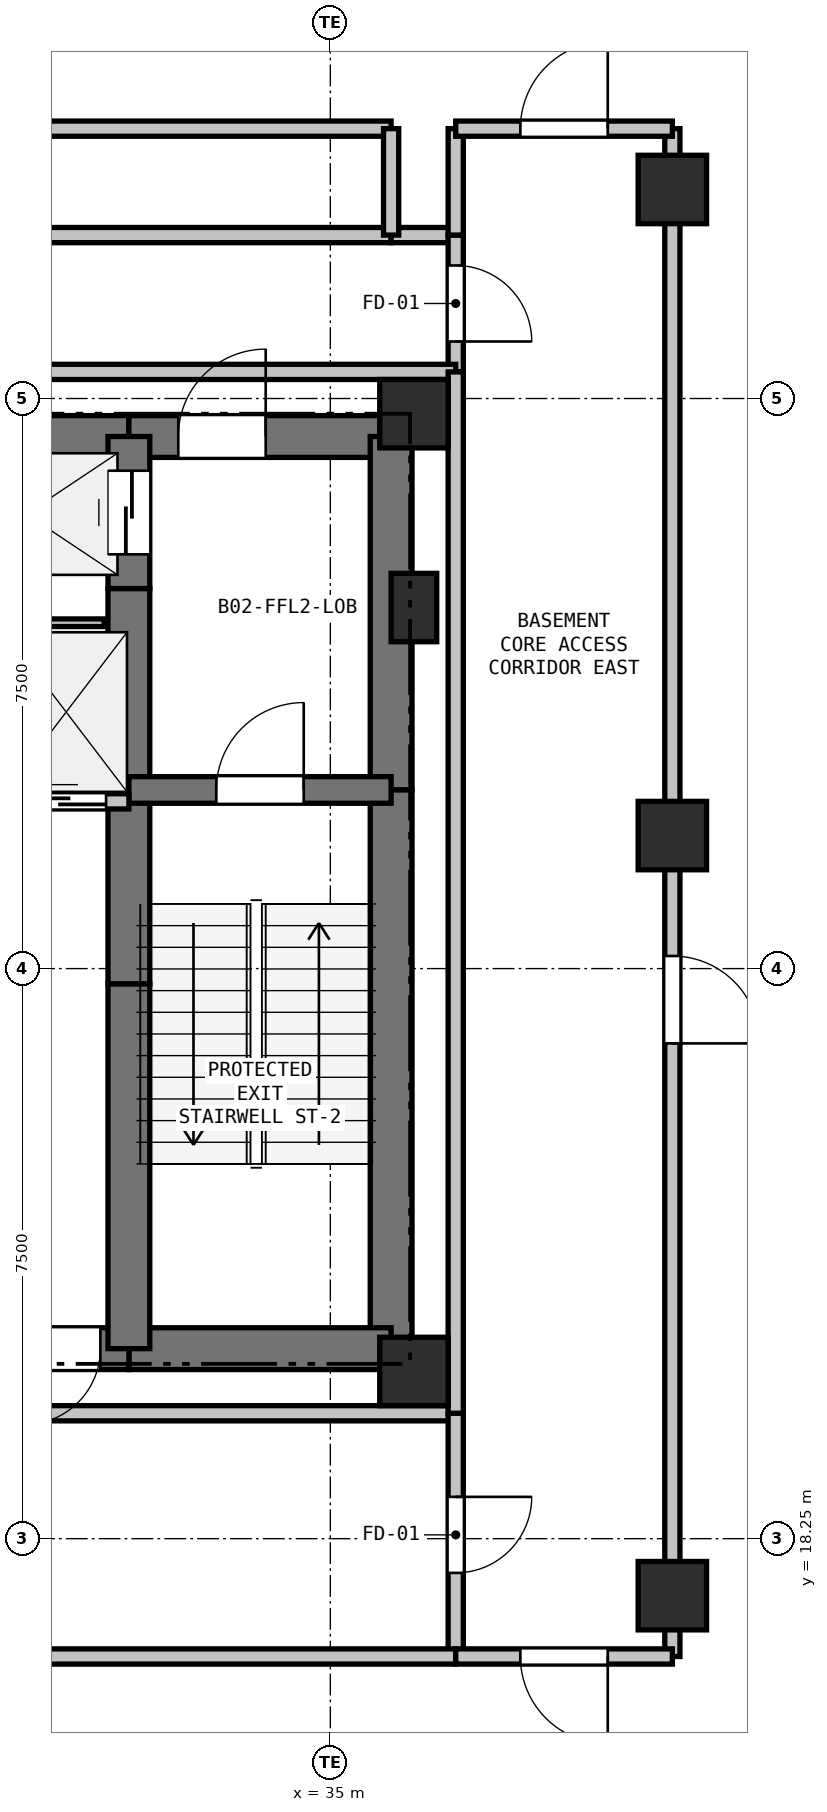
"""IFC4 building model, lengths in metres.
Left out: names, types, materials, properties, quantities, classifications, styles, units other than length and angle.
Written with IfcOpenShell. Run it as: python <this file> out.ifc"""

import sys

from ifc_helpers import new_model, si_unit, direction, frame, frame_2d, origin, origin_2d, place, context, subcontext, project, spatial, rectangle, extrude, element, fill, save


model = new_model("IFC4")
c1 = context("Model", 3, precision=1e-05, world=origin(), true_north=direction((0.0, 1.0)))
c2 = subcontext(c1, "Body", "Model", "MODEL_VIEW")
j1 = project(units=[si_unit("LENGTHUNIT", "METRE"), si_unit("PLANEANGLEUNIT", "RADIAN")], contexts=[c1])
p1 = place(None, origin())
s1 = spatial("IfcSite", under=j1, at=p1, CompositionType="ELEMENT")
p2 = place(p1, origin())
s2 = spatial("IfcBuilding", under=s1, at=p2, CompositionType="ELEMENT")
p3 = place(p2, frame((0.0, 0.0, -9.0)))
s3 = spatial("IfcBuildingStorey", under=s2, at=p3, CompositionType="ELEMENT", Elevation=-9.0)
for number, where, z_axis, x_axis in (
    (1, (39.5, 17.5, 0.0), (0.0, 0.0, 1.0), (1.0, 0.0, 0.0)),
    (2, (39.5, 27.5, 0.0), (0.0, 0.0, 1.0), (1.0, 0.0, 0.0)),
    (3, (39.5, 36.0, 0.0), (0.0, 0.0, 1.0), (1.0, 0.0, 0.0)),
    (4, (36.1, 33.05, 0.0), (0.0, 0.0, 1.0), (1.0, 0.0, 0.0)),
    (5, (36.1, 20.45, 0.0), (0.0, 0.0, 1.0), (1.0, 0.0, 0.0)),
):
    element("IfcColumn", number, at=place(p3, frame(where, z_axis=z_axis, x_axis=x_axis)), inside=s3, PredefinedType="COLUMN", context=c2, shape_type="SweptSolid", body=[
        extrude(rectangle(XDim=0.9, YDim=0.9, at=origin_2d()), origin(), (0.0, 0.0, 1.0), 4.5),
    ])
p4 = place(p3, frame((36.1, 30.5, 0.0), z_axis=(0.0, 0.0, 1.0), x_axis=(1.0, 0.0, 0.0)))
e6 = element("IfcColumn", 6, at=p4, inside=s3, PredefinedType="PILASTER", context=c2, shape_type="SweptSolid", body=[
    extrude(rectangle(XDim=0.6, YDim=0.9, at=origin_2d()), origin(), (0.0, 0.0, 1.0), 4.5),
])
p5 = place(p3, frame((29.65, 32.75, 0.0), z_axis=(0.0, 0.0, 1.0), x_axis=(1.0, 0.0, 0.0)))
e7 = element("IfcWall", 7, at=p5, inside=s3, PredefinedType="SHEAR", context=c2, shape_type="SweptSolid", body=[
    extrude(rectangle(XDim=2.7, YDim=0.55, at=frame_2d((1.35, 0.0))), origin(), (0.0, 0.0, 1.0), 4.2),
])
p6 = place(p3, frame((32.35, 32.75, 0.0), z_axis=(0.0, 0.0, 1.0), x_axis=(1.0, 0.0, 0.0)))
e8 = element("IfcWall", 8, at=p6, inside=s3, PredefinedType="SHEAR", context=c2, shape_type="SweptSolid", body=[
    extrude(rectangle(XDim=3.45, YDim=0.55, at=frame_2d((1.725, 0.0))), origin(), (0.0, 0.0, 1.0), 4.2),
])
p7 = place(p6, frame((0.65, 0.0, 0.0)))
e9 = element("IfcOpeningElement", 9, at=p7, cuts=e8, PredefinedType="OPENING", context=c2, shape_type="SweptSolid", body=[
    extrude(rectangle(XDim=1.15, YDim=2.15, at=frame_2d((0.575, 1.075))), frame((0.0, 0.285, 0.0), z_axis=(0.0, -1.0, 0.0), x_axis=(1.0, 0.0, 0.0)), (0.0, 0.0, 1.0), 0.57),
])
p8 = place(p3, frame((35.8, 32.75, 0.0), z_axis=(0.0, 0.0, 1.0), x_axis=(0.0, -1.0, 0.0)))
e10 = element("IfcWall", 10, at=p8, inside=s3, PredefinedType="SHEAR", context=c2, shape_type="SweptSolid", body=[
    extrude(rectangle(XDim=4.65, YDim=0.55, at=frame_2d((2.325, 0.0))), origin(), (0.0, 0.0, 1.0), 4.2),
])
p9 = place(p3, frame((35.8, 28.1, 0.0), z_axis=(0.0, 0.0, 1.0), x_axis=(0.0, -1.0, 0.0)))
e11 = element("IfcWall", 11, at=p9, inside=s3, PredefinedType="SHEAR", context=c2, shape_type="SweptSolid", body=[
    extrude(rectangle(XDim=7.35, YDim=0.55, at=frame_2d((3.675, 0.0))), origin(), (0.0, 0.0, 1.0), 4.2),
])
p10 = place(p3, frame((35.8, 20.75, 0.0), z_axis=(0.0, 0.0, 1.0), x_axis=(-1.0, 0.0, 0.0)))
e12 = element("IfcWall", 12, at=p10, inside=s3, PredefinedType="SHEAR", context=c2, shape_type="SweptSolid", body=[
    extrude(rectangle(XDim=3.45, YDim=0.55, at=frame_2d((1.725, 0.0))), origin(), (0.0, 0.0, 1.0), 4.2),
])
p11 = place(p3, frame((32.35, 20.75, 0.0), z_axis=(0.0, 0.0, 1.0), x_axis=(-1.0, 0.0, 0.0)))
e13 = element("IfcWall", 13, at=p11, inside=s3, PredefinedType="SHEAR", context=c2, shape_type="SweptSolid", body=[
    extrude(rectangle(XDim=1.75, YDim=0.55, at=frame_2d((0.875, 0.0))), origin(), (0.0, 0.0, 1.0), 4.2),
])
p12 = place(p11, frame((0.375, 0.0, 0.0)))
e14 = element("IfcOpeningElement", 14, at=p12, cuts=e13, PredefinedType="OPENING", context=c2, shape_type="SweptSolid", body=[
    extrude(rectangle(XDim=1.0, YDim=2.15, at=frame_2d((0.5, 1.075))), frame((0.0, 0.285, 0.0), z_axis=(0.0, -1.0, 0.0), x_axis=(1.0, 0.0, 0.0)), (0.0, 0.0, 1.0), 0.57),
])
p13 = place(p3, frame((32.35, 20.75, 0.0), z_axis=(0.0, 0.0, 1.0), x_axis=(0.0, 1.0, 0.0)))
e15 = element("IfcWall", 15, at=p13, inside=s3, PredefinedType="SHEAR", context=c2, shape_type="SweptSolid", body=[
    extrude(rectangle(XDim=4.8, YDim=0.55, at=frame_2d((2.4, 0.0))), origin(), (0.0, 0.0, 1.0), 4.2),
])
p14 = place(p3, frame((32.35, 25.55, 0.0), z_axis=(0.0, 0.0, 1.0), x_axis=(0.0, 1.0, 0.0)))
e16 = element("IfcWall", 16, at=p14, inside=s3, PredefinedType="SHEAR", context=c2, shape_type="SweptSolid", body=[
    extrude(rectangle(XDim=2.4, YDim=0.55, at=frame_2d((1.2, 0.0))), origin(), (0.0, 0.0, 1.0), 4.2),
])
p15 = place(p3, frame((32.35, 27.95, 0.0), z_axis=(0.0, 0.0, 1.0), x_axis=(0.0, 1.0, 0.0)))
e17 = element("IfcWall", 17, at=p15, inside=s3, PredefinedType="SHEAR", context=c2, shape_type="SweptSolid", body=[
    extrude(rectangle(XDim=2.8, YDim=0.55, at=frame_2d((1.4, 0.0))), origin(), (0.0, 0.0, 1.0), 4.2),
])
p16 = place(p3, frame((32.35, 30.75, 0.0), z_axis=(0.0, 0.0, 1.0), x_axis=(0.0, 1.0, 0.0)))
e18 = element("IfcWall", 18, at=p16, inside=s3, PredefinedType="SHEAR", context=c2, shape_type="SweptSolid", body=[
    extrude(rectangle(XDim=2.0, YDim=0.55, at=frame_2d((1.0, 0.0))), origin(), (0.0, 0.0, 1.0), 4.2),
])
p17 = place(p16, frame((0.45, 0.0, 0.0)))
e19 = element("IfcOpeningElement", 19, at=p17, cuts=e18, PredefinedType="OPENING", context=c2, shape_type="SweptSolid", body=[
    extrude(rectangle(XDim=1.1, YDim=2.15, at=frame_2d((0.55, 1.075))), frame((0.0, 0.285, 0.0), z_axis=(0.0, -1.0, 0.0), x_axis=(1.0, 0.0, 0.0)), (0.0, 0.0, 1.0), 0.57),
])
p18 = place(p3, frame((32.35, 28.1, 0.0), z_axis=(0.0, 0.0, 1.0), x_axis=(1.0, 0.0, 0.0)))
e20 = element("IfcWall", 20, at=p18, inside=s3, PredefinedType="SHEAR", context=c2, shape_type="SweptSolid", body=[
    extrude(rectangle(XDim=3.45, YDim=0.35, at=frame_2d((1.725, 0.0))), origin(), (0.0, 0.0, 1.0), 4.2),
])
p19 = place(p18, frame((1.15, 0.0, 0.0)))
e21 = element("IfcOpeningElement", 21, at=p19, cuts=e20, PredefinedType="OPENING", context=c2, shape_type="SweptSolid", body=[
    extrude(rectangle(XDim=1.15, YDim=2.15, at=frame_2d((0.575, 1.075))), frame((0.0, 0.185, 0.0), z_axis=(0.0, -1.0, 0.0), x_axis=(1.0, 0.0, 0.0)), (0.0, 0.0, 1.0), 0.37),
])
p20 = place(p3, frame((27.4, 27.95, 0.0), z_axis=(0.0, 0.0, 1.0), x_axis=(1.0, 0.0, 0.0)))
e22 = element("IfcWall", 22, at=p20, inside=s3, PredefinedType="PARTITIONING", context=c2, shape_type="SweptSolid", body=[
    extrude(rectangle(XDim=4.95, YDim=0.2, at=frame_2d((2.475, 0.0))), origin(), (0.0, 0.0, 1.0), 4.2),
])
p21 = place(p20, frame((0.25, 0.0, 0.0)))
e23 = element("IfcOpeningElement", 23, at=p21, cuts=e22, PredefinedType="OPENING", context=c2, shape_type="SweptSolid", body=[
    extrude(rectangle(XDim=1.1, YDim=2.15, at=frame_2d((0.55, 1.075))), frame((0.0, 0.11, 0.0), z_axis=(0.0, -1.0, 0.0), x_axis=(1.0, 0.0, 0.0)), (0.0, 0.0, 1.0), 0.22),
])
p22 = place(p20, frame((1.9, 0.0, 0.0)))
e24 = element("IfcOpeningElement", 24, at=p22, cuts=e22, PredefinedType="OPENING", context=c2, shape_type="SweptSolid", body=[
    extrude(rectangle(XDim=1.1, YDim=2.15, at=frame_2d((0.55, 1.075))), frame((0.0, 0.11, 0.0), z_axis=(0.0, -1.0, 0.0), x_axis=(1.0, 0.0, 0.0)), (0.0, 0.0, 1.0), 0.22),
])
p23 = place(p20, frame((3.55, 0.0, 0.0)))
e25 = element("IfcOpeningElement", 25, at=p23, cuts=e22, PredefinedType="OPENING", context=c2, shape_type="SweptSolid", body=[
    extrude(rectangle(XDim=1.1, YDim=2.15, at=frame_2d((0.55, 1.075))), frame((0.0, 0.11, 0.0), z_axis=(0.0, -1.0, 0.0), x_axis=(1.0, 0.0, 0.0)), (0.0, 0.0, 1.0), 0.22),
])
p24 = place(p3, frame((32.025, 30.3, 0.0), z_axis=(0.0, 0.0, 1.0), x_axis=(-1.0, 0.0, 0.0)))
e26 = element("IfcWall", 26, at=p24, inside=s3, PredefinedType="PARTITIONING", context=c2, shape_type="SweptSolid", body=[
    extrude(rectangle(XDim=1.325, YDim=0.1, at=frame_2d((0.663, 0.0))), origin(), (0.0, 0.0, 1.0), 4.2),
])
p25 = place(p3, frame((22.2, 35.4, 0.0), z_axis=(0.0, 0.0, 1.0), x_axis=(1.0, 0.0, 0.0)))
e27 = element("IfcWall", 27, at=p25, inside=s3, PredefinedType="PARTITIONING", context=c2, shape_type="SweptSolid", body=[
    extrude(rectangle(XDim=13.6, YDim=0.2, at=frame_2d((6.8, 0.0))), origin(), (0.0, 0.0, 1.0), 4.2),
])
p26 = place(p25, frame((6.375, 0.0, 0.0)))
e28 = element("IfcOpeningElement", 28, at=p26, cuts=e27, PredefinedType="OPENING", context=c2, shape_type="SweptSolid", body=[
    extrude(rectangle(XDim=0.85, YDim=2.1, at=frame_2d((0.425, 1.05))), frame((0.0, 0.11, 0.0), z_axis=(0.0, -1.0, 0.0), x_axis=(1.0, 0.0, 0.0)), (0.0, 0.0, 1.0), 0.22),
])
p27 = place(p3, frame((35.8, 35.4, 0.0), z_axis=(0.0, 0.0, 1.0), x_axis=(1.0, 0.0, 0.0)))
e29 = element("IfcWall", 29, at=p27, inside=s3, PredefinedType="PARTITIONING", context=c2, shape_type="SweptSolid", body=[
    extrude(rectangle(XDim=0.85, YDim=0.2, at=frame_2d((0.425, 0.0))), origin(), (0.0, 0.0, 1.0), 4.2),
])
p28 = place(p3, frame((36.65, 35.4, 0.0), z_axis=(0.0, 0.0, 1.0), x_axis=(0.0, -1.0, 0.0)))
e30 = element("IfcWall", 30, at=p28, inside=s3, PredefinedType="PARTITIONING", context=c2, shape_type="SweptSolid", body=[
    extrude(rectangle(XDim=1.8, YDim=0.2, at=frame_2d((0.9, 0.0))), origin(), (0.0, 0.0, 1.0), 4.2),
])
p29 = place(p28, frame((0.4, 0.0, 0.0)))
e31 = element("IfcOpeningElement", 31, at=p29, cuts=e30, PredefinedType="OPENING", context=c2, shape_type="SweptSolid", body=[
    extrude(rectangle(XDim=1.0, YDim=2.15, at=frame_2d((0.5, 1.075))), frame((0.0, 0.11, 0.0), z_axis=(0.0, -1.0, 0.0), x_axis=(1.0, 0.0, 0.0)), (0.0, 0.0, 1.0), 0.22),
])
for number, where, z_axis, x_axis in (
    (32, (36.65, 33.6, 0.0), (0.0, 0.0, 1.0), (-1.0, 0.0, 0.0)),
    (33, (21.35, 19.9, 0.0), (0.0, 0.0, 1.0), (1.0, 0.0, 0.0)),
):
    element("IfcWall", number, at=place(p3, frame(where, z_axis=z_axis, x_axis=x_axis)), inside=s3, PredefinedType="PARTITIONING", context=c2, shape_type="SweptSolid", body=[
        extrude(rectangle(XDim=15.3, YDim=0.2, at=frame_2d((7.65, 0.0))), origin(), (0.0, 0.0, 1.0), 4.2),
    ])
p30 = place(p3, frame((36.65, 19.9, 0.0), z_axis=(0.0, 0.0, 1.0), x_axis=(0.0, -1.0, 0.0)))
e34 = element("IfcWall", 34, at=p30, inside=s3, PredefinedType="PARTITIONING", context=c2, shape_type="SweptSolid", body=[
    extrude(rectangle(XDim=3.2, YDim=0.2, at=frame_2d((1.6, 0.0))), origin(), (0.0, 0.0, 1.0), 4.2),
])
p31 = place(p30, frame((1.1, 0.0, 0.0)))
e35 = element("IfcOpeningElement", 35, at=p31, cuts=e34, PredefinedType="OPENING", context=c2, shape_type="SweptSolid", body=[
    extrude(rectangle(XDim=1.0, YDim=2.15, at=frame_2d((0.5, 1.075))), frame((0.0, 0.11, 0.0), z_axis=(0.0, -1.0, 0.0), x_axis=(1.0, 0.0, 0.0)), (0.0, 0.0, 1.0), 0.22),
])
p32 = place(p3, frame((36.65, 16.7, 0.0), z_axis=(0.0, 0.0, 1.0), x_axis=(-1.0, 0.0, 0.0)))
e36 = element("IfcWall", 36, at=p32, inside=s3, PredefinedType="PARTITIONING", context=c2, shape_type="SweptSolid", body=[
    extrude(rectangle(XDim=19.25, YDim=0.2, at=frame_2d((9.625, 0.0))), origin(), (0.0, 0.0, 1.0), 4.2),
])
p33 = place(p32, frame((9.05, 0.0, 0.0)))
e37 = element("IfcOpeningElement", 37, at=p33, cuts=e36, PredefinedType="OPENING", context=c2, shape_type="SweptSolid", body=[
    extrude(rectangle(XDim=1.15, YDim=2.15, at=frame_2d((0.575, 1.075))), frame((0.0, 0.11, 0.0), z_axis=(0.0, -1.0, 0.0), x_axis=(1.0, 0.0, 0.0)), (0.0, 0.0, 1.0), 0.22),
])
p34 = place(p3, frame((39.5, 36.8, 0.0), z_axis=(0.0, 0.0, 1.0), x_axis=(0.0, -1.0, 0.0)))
e38 = element("IfcWall", 38, at=p34, inside=s3, PredefinedType="PARTITIONING", context=c2, shape_type="SweptSolid", body=[
    extrude(rectangle(XDim=20.1, YDim=0.2, at=frame_2d((10.05, 0.0))), origin(), (0.0, 0.0, 1.0), 4.2),
])
p35 = place(p34, frame((10.884, 0.0, 0.0)))
e39 = element("IfcOpeningElement", 39, at=p35, cuts=e38, PredefinedType="OPENING", context=c2, shape_type="SweptSolid", body=[
    extrude(rectangle(XDim=1.15, YDim=2.15, at=frame_2d((0.575, 1.075))), frame((0.0, 0.11, 0.0), z_axis=(0.0, -1.0, 0.0), x_axis=(1.0, 0.0, 0.0)), (0.0, 0.0, 1.0), 0.22),
])
p36 = place(p3, frame((39.5, 16.7, 0.0), z_axis=(0.0, 0.0, 1.0), x_axis=(-1.0, 0.0, 0.0)))
e40 = element("IfcWall", 40, at=p36, inside=s3, PredefinedType="PARTITIONING", context=c2, shape_type="SweptSolid", body=[
    extrude(rectangle(XDim=2.85, YDim=0.2, at=frame_2d((1.425, 0.0))), origin(), (0.0, 0.0, 1.0), 4.2),
])
p37 = place(p36, frame((0.85, 0.0, 0.0)))
e41 = element("IfcOpeningElement", 41, at=p37, cuts=e40, PredefinedType="OPENING", context=c2, shape_type="SweptSolid", body=[
    extrude(rectangle(XDim=1.15, YDim=2.15, at=frame_2d((0.575, 1.075))), frame((0.0, 0.11, 0.0), z_axis=(0.0, -1.0, 0.0), x_axis=(1.0, 0.0, 0.0)), (0.0, 0.0, 1.0), 0.22),
])
p38 = place(p3, frame((36.65, 19.9, 0.0), z_axis=(0.0, 0.0, 1.0), x_axis=(0.0, 1.0, 0.0)))
e42 = element("IfcWall", 42, at=p38, inside=s3, PredefinedType="PARTITIONING", context=c2, shape_type="SweptSolid", body=[
    extrude(rectangle(XDim=13.7, YDim=0.2, at=frame_2d((6.85, 0.0))), origin(), (0.0, 0.0, 1.0), 4.2),
])
p39 = place(p3, frame((36.65, 35.4, 0.0), z_axis=(0.0, 0.0, 1.0), x_axis=(0.0, 1.0, 0.0)))
e43 = element("IfcWall", 43, at=p39, inside=s3, PredefinedType="PARTITIONING", context=c2, shape_type="SweptSolid", body=[
    extrude(rectangle(XDim=1.4, YDim=0.2, at=frame_2d((0.7, 0.0))), origin(), (0.0, 0.0, 1.0), 4.2),
])
p40 = place(p3, frame((36.65, 36.8, 0.0), z_axis=(0.0, 0.0, 1.0), x_axis=(1.0, 0.0, 0.0)))
e44 = element("IfcWall", 44, at=p40, inside=s3, PredefinedType="PARTITIONING", context=c2, shape_type="SweptSolid", body=[
    extrude(rectangle(XDim=2.85, YDim=0.2, at=frame_2d((1.425, 0.0))), origin(), (0.0, 0.0, 1.0), 4.2),
])
p41 = place(p40, frame((0.85, 0.0, 0.0)))
e45 = element("IfcOpeningElement", 45, at=p41, cuts=e44, PredefinedType="OPENING", context=c2, shape_type="SweptSolid", body=[
    extrude(rectangle(XDim=1.15, YDim=2.15, at=frame_2d((0.575, 1.075))), frame((0.0, 0.11, 0.0), z_axis=(0.0, -1.0, 0.0), x_axis=(1.0, 0.0, 0.0)), (0.0, 0.0, 1.0), 0.22),
])
p42 = place(p3, frame((22.2, 36.8, 0.0), z_axis=(0.0, 0.0, 1.0), x_axis=(1.0, 0.0, 0.0)))
e46 = element("IfcWall", 46, at=p42, inside=s3, PredefinedType="PARTITIONING", context=c2, shape_type="SweptSolid", body=[
    extrude(rectangle(XDim=13.6, YDim=0.2, at=frame_2d((6.8, 0.0))), origin(), (0.0, 0.0, 1.0), 4.2),
])
p43 = place(p42, frame((6.225, 0.0, 0.0)))
e47 = element("IfcOpeningElement", 47, at=p43, cuts=e46, PredefinedType="OPENING", context=c2, shape_type="SweptSolid", body=[
    extrude(rectangle(XDim=1.15, YDim=2.15, at=frame_2d((0.575, 1.075))), frame((0.0, 0.11, 0.0), z_axis=(0.0, -1.0, 0.0), x_axis=(1.0, 0.0, 0.0)), (0.0, 0.0, 1.0), 0.22),
])
p44 = place(p3, frame((35.8, 36.8, 0.0), z_axis=(0.0, 0.0, 1.0), x_axis=(0.0, -1.0, 0.0)))
e48 = element("IfcWall", 48, at=p44, inside=s3, PredefinedType="PARTITIONING", context=c2, shape_type="SweptSolid", body=[
    extrude(rectangle(XDim=1.4, YDim=0.2, at=frame_2d((0.7, 0.0))), origin(), (0.0, 0.0, 1.0), 4.2),
])
p45 = place(p23, origin())
e49 = element("IfcDoor", 49, at=p45, inside=s3, OperationType="SLIDING_TO_LEFT", PredefinedType="DOOR", context=c2, shape_type="SweptSolid", body=[
    extrude(rectangle(XDim=1.1, YDim=2.15, at=frame_2d((0.55, 1.075))), frame((0.0, 0.025, 0.0), z_axis=(0.0, -1.0, 0.0), x_axis=(1.0, 0.0, 0.0)), (0.0, 0.0, 1.0), 0.05),
])
fill(e25, e49)
p46 = place(p12, origin())
e50 = element("IfcDoor", 50, at=p46, inside=s3, OperationType="SINGLE_SWING_RIGHT", PredefinedType="DOOR", context=c2, shape_type="SweptSolid", body=[
    extrude(rectangle(XDim=1.0, YDim=2.15, at=frame_2d((0.5, 1.075))), frame((0.0, 0.025, 0.0), z_axis=(0.0, -1.0, 0.0), x_axis=(1.0, 0.0, 0.0)), (0.0, 0.0, 1.0), 0.05),
])
fill(e14, e50)
p47 = place(p17, origin())
e51 = element("IfcDoor", 51, at=p47, inside=s3, OperationType="SLIDING_TO_LEFT", PredefinedType="DOOR", context=c2, shape_type="SweptSolid", body=[
    extrude(rectangle(XDim=1.1, YDim=2.15, at=frame_2d((0.55, 1.075))), frame((0.0, 0.025, 0.0), z_axis=(0.0, -1.0, 0.0), x_axis=(1.0, 0.0, 0.0)), (0.0, 0.0, 1.0), 0.05),
])
fill(e19, e51)
p48 = place(p19, origin())
e52 = element("IfcDoor", 52, at=p48, inside=s3, OperationType="SINGLE_SWING_RIGHT", PredefinedType="DOOR", context=c2, shape_type="SweptSolid", body=[
    extrude(rectangle(XDim=1.15, YDim=2.15, at=frame_2d((0.575, 1.075))), frame((0.0, 0.025, 0.0), z_axis=(0.0, -1.0, 0.0), x_axis=(1.0, 0.0, 0.0)), (0.0, 0.0, 1.0), 0.05),
])
fill(e21, e52)
p49 = place(p7, origin())
e53 = element("IfcDoor", 53, at=p49, inside=s3, OperationType="SINGLE_SWING_RIGHT", PredefinedType="DOOR", context=c2, shape_type="SweptSolid", body=[
    extrude(rectangle(XDim=1.15, YDim=2.15, at=frame_2d((0.575, 1.075))), frame((0.0, 0.025, 0.0), z_axis=(0.0, -1.0, 0.0), x_axis=(1.0, 0.0, 0.0)), (0.0, 0.0, 1.0), 0.05),
])
fill(e9, e53)
p50 = place(p29, origin())
e54 = element("IfcDoor", 54, at=p50, inside=s3, OperationType="SINGLE_SWING_RIGHT", PredefinedType="DOOR", context=c2, shape_type="SweptSolid", body=[
    extrude(rectangle(XDim=1.0, YDim=2.15, at=frame_2d((0.5, 1.075))), frame((0.0, 0.025, 0.0), z_axis=(0.0, -1.0, 0.0), x_axis=(1.0, 0.0, 0.0)), (0.0, 0.0, 1.0), 0.05),
])
fill(e31, e54)
p51 = place(p31, origin())
e55 = element("IfcDoor", 55, at=p51, inside=s3, OperationType="SINGLE_SWING_LEFT", PredefinedType="DOOR", context=c2, shape_type="SweptSolid", body=[
    extrude(rectangle(XDim=1.0, YDim=2.15, at=frame_2d((0.5, 1.075))), frame((0.0, 0.025, 0.0), z_axis=(0.0, -1.0, 0.0), x_axis=(1.0, 0.0, 0.0)), (0.0, 0.0, 1.0), 0.05),
])
fill(e35, e55)
p52 = place(p35, origin())
e56 = element("IfcDoor", 56, at=p52, inside=s3, OperationType="SINGLE_SWING_RIGHT", PredefinedType="DOOR", context=c2, shape_type="SweptSolid", body=[
    extrude(rectangle(XDim=1.15, YDim=2.15, at=frame_2d((0.575, 1.075))), frame((0.0, 0.025, 0.0), z_axis=(0.0, -1.0, 0.0), x_axis=(1.0, 0.0, 0.0)), (0.0, 0.0, 1.0), 0.05),
])
fill(e39, e56)
p53 = place(p37, origin())
e57 = element("IfcDoor", 57, at=p53, inside=s3, OperationType="SINGLE_SWING_LEFT", PredefinedType="DOOR", context=c2, shape_type="SweptSolid", body=[
    extrude(rectangle(XDim=1.15, YDim=2.15, at=frame_2d((0.575, 1.075))), frame((0.0, 0.025, 0.0), z_axis=(0.0, -1.0, 0.0), x_axis=(1.0, 0.0, 0.0)), (0.0, 0.0, 1.0), 0.05),
])
fill(e41, e57)
p54 = place(p41, origin())
e58 = element("IfcDoor", 58, at=p54, inside=s3, OperationType="SINGLE_SWING_RIGHT", PredefinedType="DOOR", context=c2, shape_type="SweptSolid", body=[
    extrude(rectangle(XDim=1.15, YDim=2.15, at=frame_2d((0.575, 1.075))), frame((0.0, 0.025, 0.0), z_axis=(0.0, -1.0, 0.0), x_axis=(1.0, 0.0, 0.0)), (0.0, 0.0, 1.0), 0.05),
])
fill(e45, e58)
save(model, sys.argv[1])
